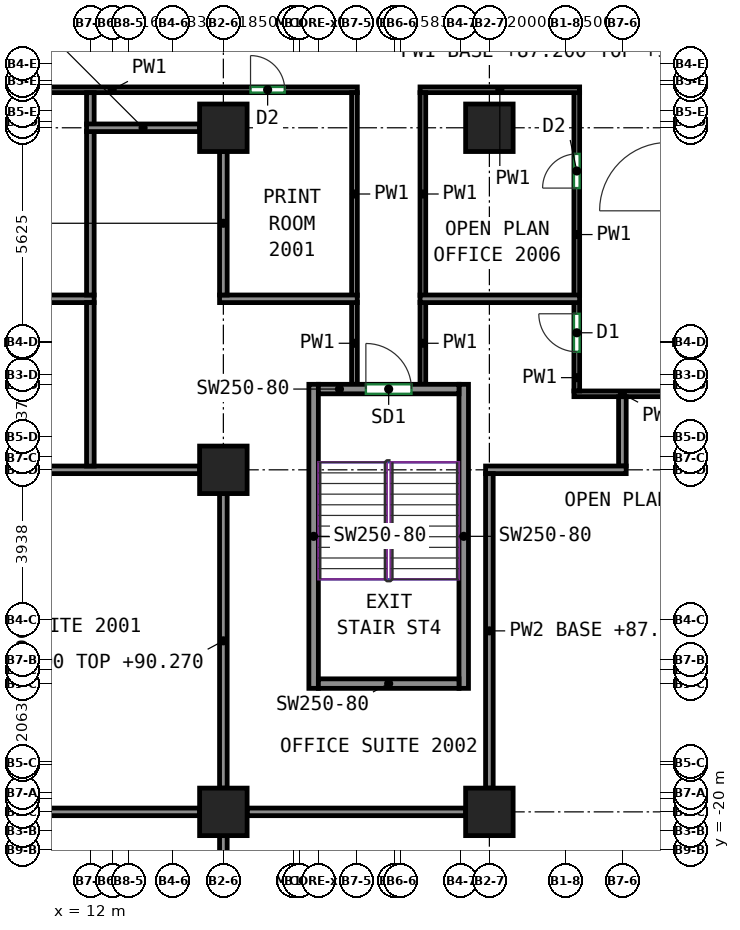
"""IFC4 building model, lengths in metres.
Left out: names, types, materials, properties, quantities, classifications, styles, units other than length and angle.
Written with IfcOpenShell. Run it as: python <this file> out.ifc"""

import sys

from ifc_helpers import new_model, si_unit, direction, frame, frame_2d, origin, origin_2d, place, context, subcontext, project, spatial, rectangle, extrude, source, transform, mapped, element, fill, save


model = new_model("IFC4")
c1 = context("Model", 3, precision=1e-05, world=origin(), true_north=direction((0.0, 1.0)))
c2 = subcontext(c1, "Body", "Model", "MODEL_VIEW")
j1 = project(units=[si_unit("LENGTHUNIT", "METRE"), si_unit("PLANEANGLEUNIT", "RADIAN")], contexts=[c1])
p1 = place(None, origin())
s1 = spatial("IfcSite", under=j1, at=p1, CompositionType="ELEMENT")
p2 = place(p1, origin())
s2 = spatial("IfcBuilding", under=s1, at=p2, CompositionType="ELEMENT")
p3 = place(p2, frame((0.0, 0.0, 87.2)))
s3 = spatial("IfcBuildingStorey", under=s2, at=p3, CompositionType="ELEMENT", Elevation=87.2)
m1 = source(origin(), c2, "Body", "SweptSolid", [
    extrude(rectangle(XDim=1.25, YDim=1.25, at=origin_2d()), origin(), (0.0, 0.0, 1.0), 3.72),
])
for number, where, z_axis, x_axis in (
    (1, (15.5, -19.0, 0.0), (0.0, 0.0, 1.0), (1.0, 0.0, 0.0)),
    (2, (15.5, -10.0, 0.0), (0.0, 0.0, 1.0), (1.0, 0.0, 0.0)),
    (3, (15.5, -1.0, 0.0), (0.0, 0.0, 1.0), (1.0, 0.0, 0.0)),
    (4, (22.5, -19.0, 0.0), (0.0, 0.0, 1.0), (1.0, 0.0, 0.0)),
    (5, (22.5, -1.0, 0.0), (0.0, 0.0, 1.0), (1.0, 0.0, 0.0)),
):
    element("IfcColumn", number, at=place(p3, frame(where, z_axis=z_axis, x_axis=x_axis)), inside=s3, PredefinedType="COLUMN", context=c2, shape_type="MappedRepresentation", body=[
        mapped(m1, transform((0.0, 0.0, 0.0))),
    ])
m2 = source(origin(), c2, "Body", "SweptSolid", [
    extrude(rectangle(XDim=8.0, YDim=0.25, at=frame_2d((4.0, 0.0))), origin(), (0.0, 0.0, 1.0), 3.72),
])
for number, where, z_axis, x_axis in (
    (6, (17.875, -15.75, 0.0), (0.0, 0.0, 1.0), (0.0, 1.0, 0.0)),
    (7, (21.825, -15.75, 0.0), (0.0, 0.0, 1.0), (0.0, 1.0, 0.0)),
):
    element("IfcWall", number, at=place(p3, frame(where, z_axis=z_axis, x_axis=x_axis)), inside=s3, PredefinedType="SHEAR", context=c2, shape_type="MappedRepresentation", body=[
        mapped(m2, transform((0.0, 0.0, 0.0))),
    ])
m3 = source(origin(), c2, "Body", "SweptSolid", [
    extrude(rectangle(XDim=3.7, YDim=0.25, at=frame_2d((1.85, 0.0))), origin(), (0.0, 0.0, 1.0), 3.72),
])
p4 = place(p3, frame((18.0, -15.625, 0.0), z_axis=(0.0, 0.0, 1.0), x_axis=(1.0, 0.0, 0.0)))
e8 = element("IfcWall", 8, at=p4, inside=s3, PredefinedType="SHEAR", context=c2, shape_type="MappedRepresentation", body=[
    mapped(m3, transform((0.0, 0.0, 0.0))),
])
p5 = place(p3, frame((18.0, -7.875, 0.0), z_axis=(0.0, 0.0, 1.0), x_axis=(1.0, 0.0, 0.0)))
e9 = element("IfcWall", 9, at=p5, inside=s3, PredefinedType="SHEAR", context=c2, shape_type="MappedRepresentation", body=[
    mapped(m3, transform((0.0, 0.0, 0.0))),
])
p6 = place(p5, frame((1.25, 0.0, 0.0)))
e10 = element("IfcOpeningElement", 10, at=p6, cuts=e9, PredefinedType="OPENING", context=c2, shape_type="SweptSolid", body=[
    extrude(rectangle(XDim=1.2, YDim=2.1, at=frame_2d((0.6, 1.05))), frame((0.0, 0.135, 0.0), z_axis=(0.0, -1.0, 0.0), x_axis=(1.0, 0.0, 0.0)), (0.0, 0.0, 1.0), 0.27),
])
p7 = place(p3, frame((6.125, 0.0, 0.0), z_axis=(0.0, 0.0, 1.0), x_axis=(1.0, 0.0, 0.0)))
e11 = element("IfcWall", 11, at=p7, inside=s3, PredefinedType="PARTITIONING", context=c2, shape_type="SweptSolid", body=[
    extrude(rectangle(XDim=12.9, YDim=0.15, at=frame_2d((6.45, 0.0))), origin(), (0.0, 0.0, 1.0), 3.72),
])
p8 = place(p7, frame((3.257, 0.0, 0.0)))
e12 = element("IfcOpeningElement", 12, at=p8, cuts=e11, PredefinedType="OPENING", context=c2, shape_type="SweptSolid", body=[
    extrude(rectangle(XDim=0.9, YDim=2.1, at=frame_2d((0.45, 1.05))), frame((0.0, 0.085, 0.0), z_axis=(0.0, -1.0, 0.0), x_axis=(1.0, 0.0, 0.0)), (0.0, 0.0, 1.0), 0.17),
])
p9 = place(p7, frame((10.09, 0.0, 0.0)))
e13 = element("IfcOpeningElement", 13, at=p9, cuts=e11, PredefinedType="OPENING", context=c2, shape_type="SweptSolid", body=[
    extrude(rectangle(XDim=0.9, YDim=2.1, at=frame_2d((0.45, 1.05))), frame((0.0, 0.085, 0.0), z_axis=(0.0, -1.0, 0.0), x_axis=(1.0, 0.0, 0.0)), (0.0, 0.0, 1.0), 0.17),
])
p10 = place(p3, frame((18.95, -5.41, 0.0), z_axis=(0.0, 0.0, 1.0), x_axis=(0.0, 1.0, 0.0)))
e14 = element("IfcWall", 14, at=p10, inside=s3, PredefinedType="PARTITIONING", context=c2, shape_type="SweptSolid", body=[
    extrude(rectangle(XDim=5.335, YDim=0.15, at=frame_2d((2.667, 0.0))), origin(), (0.0, 0.0, 1.0), 3.72),
])
p11 = place(p3, frame((24.725, -8.0, 0.0), z_axis=(0.0, 0.0, 1.0), x_axis=(1.0, 0.0, 0.0)))
e15 = element("IfcWall", 15, at=p11, inside=s3, PredefinedType="PARTITIONING", context=c2, shape_type="SweptSolid", body=[
    extrude(rectangle(XDim=2.55, YDim=0.15, at=frame_2d((1.275, 0.0))), origin(), (0.0, 0.0, 1.0), 3.72),
])
p12 = place(p3, frame((24.8, -7.925, 0.0), z_axis=(0.0, 0.0, 1.0), x_axis=(0.0, 1.0, 0.0)))
e16 = element("IfcWall", 16, at=p12, inside=s3, PredefinedType="PARTITIONING", context=c2, shape_type="SweptSolid", body=[
    extrude(rectangle(XDim=2.335, YDim=0.15, at=frame_2d((1.167, 0.0))), origin(), (0.0, 0.0, 1.0), 3.72),
])
p13 = place(p12, frame((1.031, 0.0, 0.0)))
e17 = element("IfcOpeningElement", 17, at=p13, cuts=e16, PredefinedType="OPENING", context=c2, shape_type="SweptSolid", body=[
    extrude(rectangle(XDim=1.0, YDim=2.1, at=frame_2d((0.5, 1.05))), frame((0.0, 0.085, 0.0), z_axis=(0.0, -1.0, 0.0), x_axis=(1.0, 0.0, 0.0)), (0.0, 0.0, 1.0), 0.17),
])
for number, where, z_axis, x_axis in (
    (18, (20.75, -7.75, 0.0), (0.0, 0.0, 1.0), (0.0, 1.0, 0.0)),
    (19, (18.95, -7.75, 0.0), (0.0, 0.0, 1.0), (0.0, 1.0, 0.0)),
):
    element("IfcWall", number, at=place(p3, frame(where, z_axis=z_axis, x_axis=x_axis)), inside=s3, PredefinedType="PARTITIONING", context=c2, shape_type="SweptSolid", body=[
        extrude(rectangle(XDim=2.16, YDim=0.15, at=frame_2d((1.08, 0.0))), origin(), (0.0, 0.0, 1.0), 3.72),
    ])
p14 = place(p3, frame((24.8, -5.41, 0.0), z_axis=(0.0, 0.0, 1.0), x_axis=(0.0, 1.0, 0.0)))
e20 = element("IfcWall", 20, at=p14, inside=s3, PredefinedType="PARTITIONING", context=c2, shape_type="SweptSolid", body=[
    extrude(rectangle(XDim=5.335, YDim=0.15, at=frame_2d((2.667, 0.0))), origin(), (0.0, 0.0, 1.0), 3.72),
])
p15 = place(p14, frame((2.823, 0.0, 0.0)))
e21 = element("IfcOpeningElement", 21, at=p15, cuts=e20, PredefinedType="OPENING", context=c2, shape_type="SweptSolid", body=[
    extrude(rectangle(XDim=0.9, YDim=2.1, at=frame_2d((0.45, 1.05))), frame((0.0, 0.085, 0.0), z_axis=(0.0, -1.0, 0.0), x_axis=(1.0, 0.0, 0.0)), (0.0, 0.0, 1.0), 0.17),
])
p16 = place(p3, frame((20.675, 0.0, 0.0), z_axis=(0.0, 0.0, 1.0), x_axis=(1.0, 0.0, 0.0)))
e22 = element("IfcWall", 22, at=p16, inside=s3, PredefinedType="PARTITIONING", context=c2, shape_type="SweptSolid", body=[
    extrude(rectangle(XDim=4.2, YDim=0.15, at=frame_2d((2.1, 0.0))), origin(), (0.0, 0.0, 1.0), 3.72),
])
p17 = place(p3, frame((20.75, -5.41, 0.0), z_axis=(0.0, 0.0, 1.0), x_axis=(0.0, 1.0, 0.0)))
e23 = element("IfcWall", 23, at=p17, inside=s3, PredefinedType="PARTITIONING", context=c2, shape_type="SweptSolid", body=[
    extrude(rectangle(XDim=5.335, YDim=0.15, at=frame_2d((2.667, 0.0))), origin(), (0.0, 0.0, 1.0), 3.72),
])
p18 = place(p3, frame((9.125, -19.0, 0.0), z_axis=(0.0, 0.0, 1.0), x_axis=(1.0, 0.0, 0.0)))
e24 = element("IfcWall", 24, at=p18, inside=s3, PredefinedType="PARTITIONING", context=c2, shape_type="SweptSolid", body=[
    extrude(rectangle(XDim=5.75, YDim=0.2, at=frame_2d((2.875, 0.0))), origin(), (0.0, 0.0, 1.0), 3.72),
])
p19 = place(p3, frame((15.5, -27.1, 0.0), z_axis=(0.0, 0.0, 1.0), x_axis=(0.0, 1.0, 0.0)))
e25 = element("IfcWall", 25, at=p19, inside=s3, PredefinedType="PARTITIONING", context=c2, shape_type="SweptSolid", body=[
    extrude(rectangle(XDim=7.475, YDim=0.2, at=frame_2d((3.738, 0.0))), origin(), (0.0, 0.0, 1.0), 3.07),
])
p20 = place(p3, frame((9.125, -10.0, 0.0), z_axis=(0.0, 0.0, 1.0), x_axis=(1.0, 0.0, 0.0)))
e26 = element("IfcWall", 26, at=p20, inside=s3, PredefinedType="PARTITIONING", context=c2, shape_type="SweptSolid", body=[
    extrude(rectangle(XDim=5.75, YDim=0.2, at=frame_2d((2.875, 0.0))), origin(), (0.0, 0.0, 1.0), 3.72),
])
p21 = place(p3, frame((15.5, -18.375, 0.0), z_axis=(0.0, 0.0, 1.0), x_axis=(0.0, 1.0, 0.0)))
e27 = element("IfcWall", 27, at=p21, inside=s3, PredefinedType="PARTITIONING", context=c2, shape_type="SweptSolid", body=[
    extrude(rectangle(XDim=7.75, YDim=0.2, at=frame_2d((3.875, 0.0))), origin(), (0.0, 0.0, 1.0), 3.07),
])
p22 = place(p3, frame((6.126, -5.5, 0.0), z_axis=(0.0, 0.0, 1.0), x_axis=(1.0, 0.0, 0.0)))
e28 = element("IfcWall", 28, at=p22, inside=s3, PredefinedType="PARTITIONING", context=c2, shape_type="SweptSolid", body=[
    extrude(rectangle(XDim=5.974, YDim=0.2, at=frame_2d((2.987, 0.0))), origin(), (0.0, 0.0, 1.0), 3.72),
])
p23 = place(p3, frame((12.0, -9.9, 0.0), z_axis=(0.0, 0.0, 1.0), x_axis=(0.0, 1.0, 0.0)))
e29 = element("IfcWall", 29, at=p23, inside=s3, PredefinedType="PARTITIONING", context=c2, shape_type="SweptSolid", body=[
    extrude(rectangle(XDim=4.3, YDim=0.2, at=frame_2d((2.15, 0.0))), origin(), (0.0, 0.0, 1.0), 3.72),
])
p24 = place(p3, frame((12.0, -0.91, 0.0), z_axis=(0.0, 0.0, 1.0), x_axis=(0.0, 1.0, 0.0)))
e30 = element("IfcWall", 30, at=p24, inside=s3, PredefinedType="PARTITIONING", context=c2, shape_type="SweptSolid", body=[
    extrude(rectangle(XDim=0.834, YDim=0.2, at=frame_2d((0.417, 0.0))), origin(), (0.0, 0.0, 1.0), 3.72),
])
p25 = place(p3, frame((12.0, -5.4, 0.0), z_axis=(0.0, 0.0, 1.0), x_axis=(0.0, 1.0, 0.0)))
e31 = element("IfcWall", 31, at=p25, inside=s3, PredefinedType="PARTITIONING", context=c2, shape_type="SweptSolid", body=[
    extrude(rectangle(XDim=4.31, YDim=0.2, at=frame_2d((2.155, 0.0))), origin(), (0.0, 0.0, 1.0), 3.72),
])
p26 = place(p3, frame((15.4, -5.5, 0.0), z_axis=(0.0, 0.0, 1.0), x_axis=(1.0, 0.0, 0.0)))
e32 = element("IfcWall", 32, at=p26, inside=s3, PredefinedType="PARTITIONING", context=c2, shape_type="SweptSolid", body=[
    extrude(rectangle(XDim=3.624, YDim=0.2, at=frame_2d((1.812, 0.0))), origin(), (0.0, 0.0, 1.0), 3.72),
])
p27 = place(p3, frame((15.5, -5.4, 0.0), z_axis=(0.0, 0.0, 1.0), x_axis=(0.0, 1.0, 0.0)))
e33 = element("IfcWall", 33, at=p27, inside=s3, PredefinedType="PARTITIONING", context=c2, shape_type="SweptSolid", body=[
    extrude(rectangle(XDim=3.775, YDim=0.2, at=frame_2d((1.887, 0.0))), origin(), (0.0, 0.0, 1.0), 3.07),
])
p28 = place(p3, frame((11.9, -1.0, 0.0), z_axis=(0.0, 0.0, 1.0), x_axis=(1.0, 0.0, 0.0)))
e34 = element("IfcWall", 34, at=p28, inside=s3, PredefinedType="PARTITIONING", context=c2, shape_type="SweptSolid", body=[
    extrude(rectangle(XDim=2.975, YDim=0.2, at=frame_2d((1.488, 0.0))), origin(), (0.0, 0.0, 1.0), 3.07),
])
p29 = place(p3, frame((20.676, -5.5, 0.0), z_axis=(0.0, 0.0, 1.0), x_axis=(1.0, 0.0, 0.0)))
e35 = element("IfcWall", 35, at=p29, inside=s3, PredefinedType="PARTITIONING", context=c2, shape_type="SweptSolid", body=[
    extrude(rectangle(XDim=4.198, YDim=0.2, at=frame_2d((2.099, 0.0))), origin(), (0.0, 0.0, 1.0), 3.72),
])
p30 = place(p3, frame((26.0, -9.9, 0.0), z_axis=(0.0, 0.0, 1.0), x_axis=(0.0, 1.0, 0.0)))
e36 = element("IfcWall", 36, at=p30, inside=s3, PredefinedType="PARTITIONING", context=c2, shape_type="SweptSolid", body=[
    extrude(rectangle(XDim=1.824, YDim=0.2, at=frame_2d((0.912, 0.0))), origin(), (0.0, 0.0, 1.0), 3.72),
])
p31 = place(p3, frame((22.4, -10.0, 0.0), z_axis=(0.0, 0.0, 1.0), x_axis=(1.0, 0.0, 0.0)))
e37 = element("IfcWall", 37, at=p31, inside=s3, PredefinedType="PARTITIONING", context=c2, shape_type="SweptSolid", body=[
    extrude(rectangle(XDim=3.7, YDim=0.2, at=frame_2d((1.85, 0.0))), origin(), (0.0, 0.0, 1.0), 3.72),
])
p32 = place(p3, frame((22.5, -18.375, 0.0), z_axis=(0.0, 0.0, 1.0), x_axis=(0.0, 1.0, 0.0)))
e38 = element("IfcWall", 38, at=p32, inside=s3, PredefinedType="PARTITIONING", context=c2, shape_type="SweptSolid", body=[
    extrude(rectangle(XDim=8.275, YDim=0.2, at=frame_2d((4.137, 0.0))), origin(), (0.0, 0.0, 1.0), 3.07),
])
p33 = place(p3, frame((16.125, -19.0, 0.0), z_axis=(0.0, 0.0, 1.0), x_axis=(1.0, 0.0, 0.0)))
e39 = element("IfcWall", 39, at=p33, inside=s3, PredefinedType="PARTITIONING", context=c2, shape_type="SweptSolid", body=[
    extrude(rectangle(XDim=5.75, YDim=0.2, at=frame_2d((2.875, 0.0))), origin(), (0.0, 0.0, 1.0), 3.72),
])
p34 = place(p6, origin())
e40 = element("IfcDoor", 40, at=p34, inside=s3, OperationType="DOUBLE_DOOR_SINGLE_SWING", PredefinedType="DOOR", context=c2, shape_type="SweptSolid", body=[
    extrude(rectangle(XDim=1.2, YDim=2.1, at=frame_2d((0.6, 1.05))), frame((0.0, 0.025, 0.0), z_axis=(0.0, -1.0, 0.0), x_axis=(1.0, 0.0, 0.0)), (0.0, 0.0, 1.0), 0.05),
])
fill(e10, e40)
p35 = place(p13, origin())
e41 = element("IfcDoor", 41, at=p35, inside=s3, OperationType="SINGLE_SWING_RIGHT", PredefinedType="DOOR", context=c2, shape_type="SweptSolid", body=[
    extrude(rectangle(XDim=1.0, YDim=2.1, at=frame_2d((0.5, 1.05))), frame((0.0, 0.025, 0.0), z_axis=(0.0, -1.0, 0.0), x_axis=(1.0, 0.0, 0.0)), (0.0, 0.0, 1.0), 0.05),
])
fill(e17, e41)
p36 = place(p15, origin())
e42 = element("IfcDoor", 42, at=p36, inside=s3, OperationType="SINGLE_SWING_LEFT", PredefinedType="DOOR", context=c2, shape_type="SweptSolid", body=[
    extrude(rectangle(XDim=0.9, YDim=2.1, at=frame_2d((0.45, 1.05))), frame((0.0, 0.025, 0.0), z_axis=(0.0, -1.0, 0.0), x_axis=(1.0, 0.0, 0.0)), (0.0, 0.0, 1.0), 0.05),
])
fill(e21, e42)
p37 = place(p9, origin())
e43 = element("IfcDoor", 43, at=p37, inside=s3, OperationType="SINGLE_SWING_LEFT", PredefinedType="DOOR", context=c2, shape_type="SweptSolid", body=[
    extrude(rectangle(XDim=0.9, YDim=2.1, at=frame_2d((0.45, 1.05))), frame((0.0, 0.025, 0.0), z_axis=(0.0, -1.0, 0.0), x_axis=(1.0, 0.0, 0.0)), (0.0, 0.0, 1.0), 0.05),
])
fill(e13, e43)
save(model, sys.argv[1])
